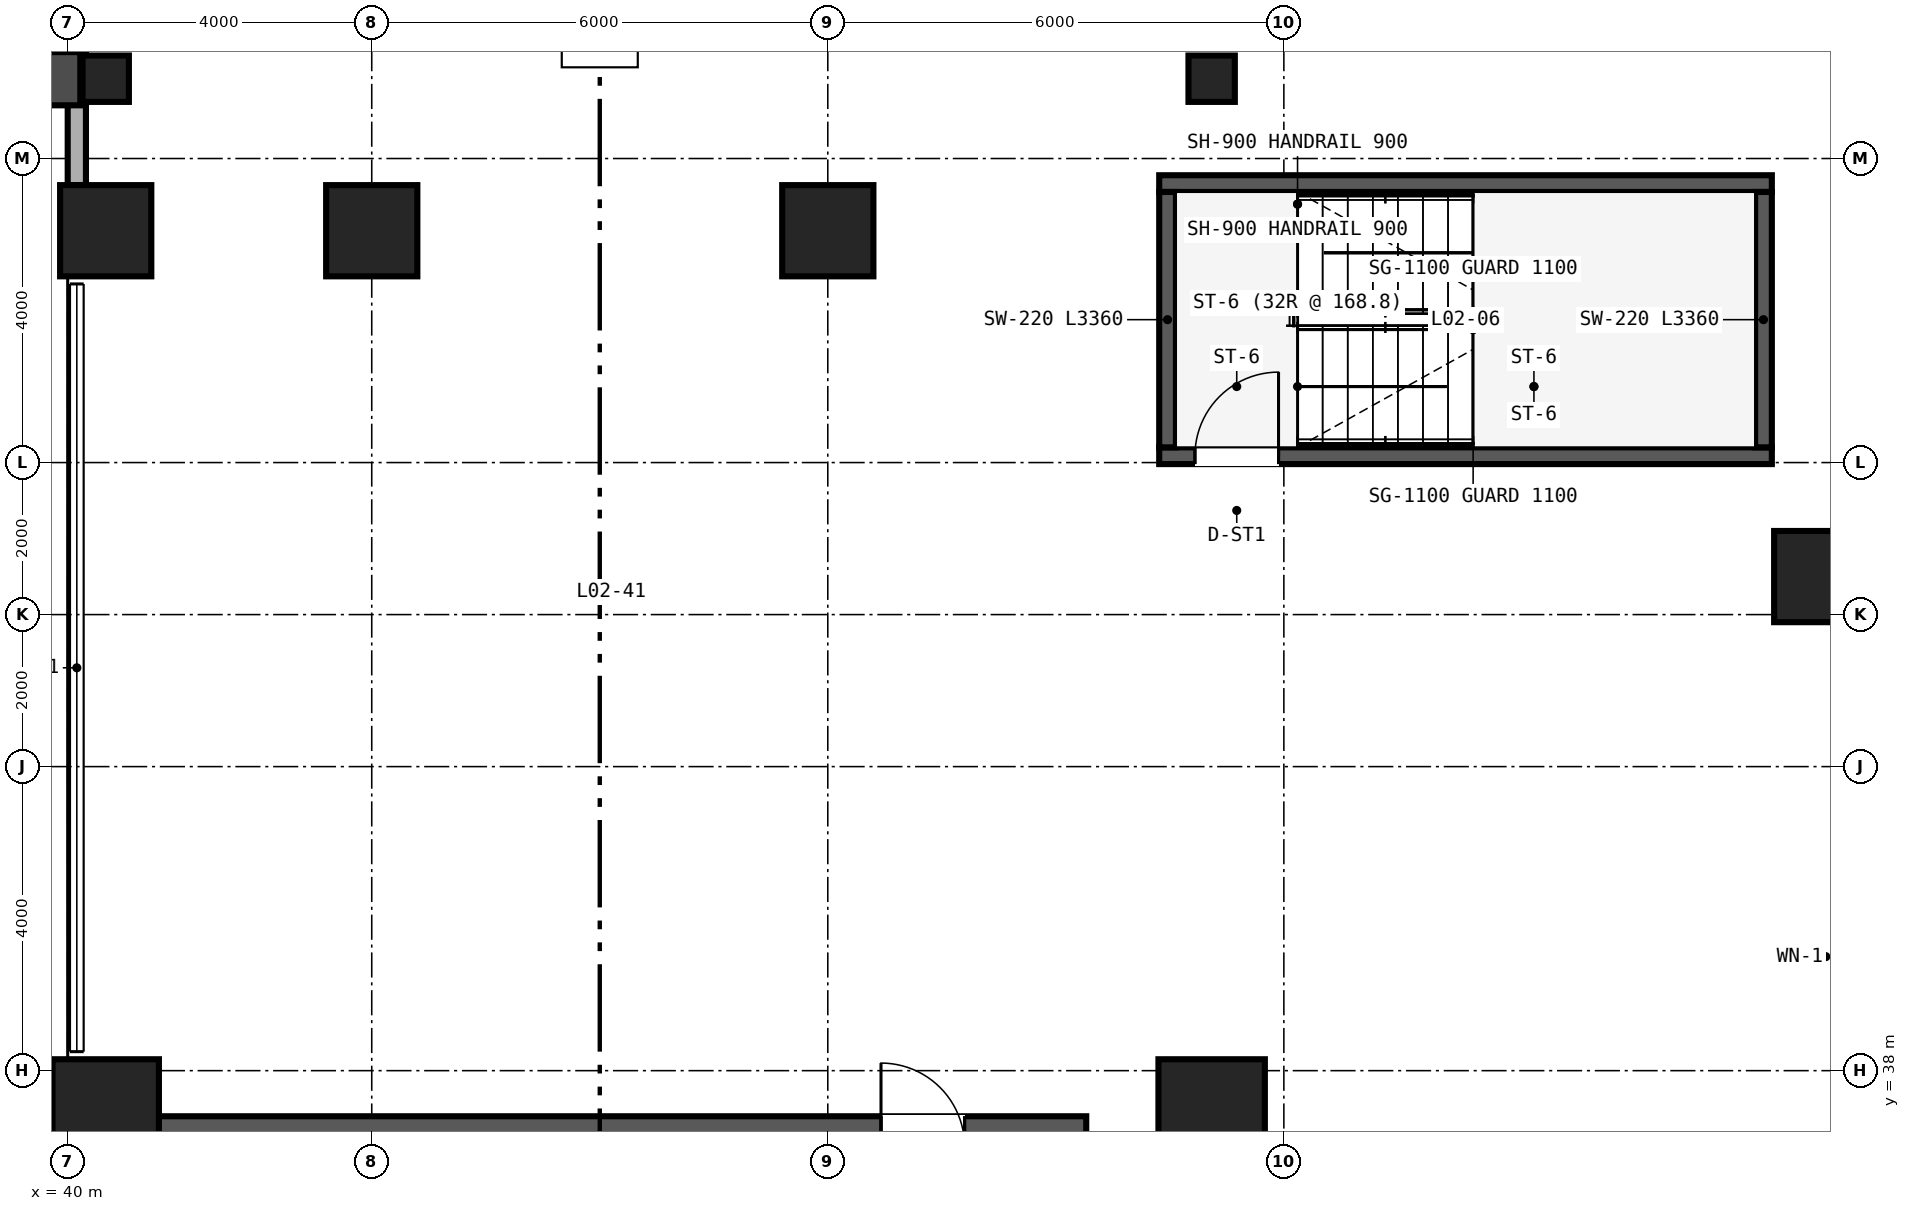
"""IFC4 building model, lengths in metres.
Left out: names, types, materials, properties, quantities, classifications, styles, units other than length and angle.
Written with IfcOpenShell. Run it as: python <this file> out.ifc"""

import sys

from ifc_helpers import new_model, si_unit, direction, frame, frame_2d, origin, origin_2d, place, context, subcontext, project, spatial, rectangle, hollow_circle, extrude, source, transform, mapped, element, fill, save


model = new_model("IFC4")
c1 = context("Model", 3, precision=1e-05, world=origin(), true_north=direction((0.0, 1.0)))
c2 = subcontext(c1, "Body", "Model", "MODEL_VIEW")
j1 = project(units=[si_unit("LENGTHUNIT", "METRE"), si_unit("PLANEANGLEUNIT", "RADIAN")], contexts=[c1])
p1 = place(None, origin())
s1 = spatial("IfcSite", under=j1, at=p1, CompositionType="ELEMENT")
p2 = place(p1, origin())
s2 = spatial("IfcBuilding", under=s1, at=p2, CompositionType="ELEMENT")
p3 = place(p2, frame((0.0, 0.0, 6.0)))
s3 = spatial("IfcBuildingStorey", under=s2, at=p3, CompositionType="ELEMENT", Elevation=6.0)
p4 = place(p3, frame((40.6, 37.0, 0.0), z_axis=(0.0, 0.0, 1.0), x_axis=(1.0, 0.0, 0.0)))
e1 = element("IfcWall", 1, at=p4, inside=s3, PredefinedType="SHEAR", context=c2, shape_type="SweptSolid", body=[
    extrude(rectangle(XDim=12.8, YDim=0.8, at=frame_2d((6.4, 0.0))), origin(), (0.0, 0.0, 1.0), 5.08),
])
p5 = place(p4, frame((10.1, 0.0, 0.0)))
e2 = element("IfcOpeningElement", 2, at=p5, cuts=e1, PredefinedType="OPENING", context=c2, shape_type="SweptSolid", body=[
    extrude(rectangle(XDim=1.1, YDim=2.15, at=frame_2d((0.55, 1.075))), frame((0.0, 0.41, 0.0), z_axis=(0.0, -1.0, 0.0), x_axis=(1.0, 0.0, 0.0)), (0.0, 0.0, 1.0), 0.82),
])
p6 = place(p3, frame((54.36, 46.09, 0.0), z_axis=(0.0, 0.0, 1.0), x_axis=(1.0, 0.0, 0.0)))
e3 = element("IfcWall", 3, at=p6, inside=s3, PredefinedType="SHEAR", context=c2, shape_type="SweptSolid", body=[
    extrude(rectangle(XDim=8.06, YDim=0.22, at=frame_2d((4.03, 0.0))), origin(), (0.0, 0.0, 1.0), 5.2),
])
p7 = place(p6, frame((0.47, 0.0, 0.0)))
e4 = element("IfcOpeningElement", 4, at=p7, cuts=e3, PredefinedType="OPENING", context=c2, shape_type="SweptSolid", body=[
    extrude(rectangle(XDim=1.1, YDim=2.15, at=frame_2d((0.55, 1.075))), frame((0.0, 0.12, 0.0), z_axis=(0.0, -1.0, 0.0), x_axis=(1.0, 0.0, 0.0)), (0.0, 0.0, 1.0), 0.24),
])
p8 = place(p3, frame((54.36, 49.67, 0.0), z_axis=(0.0, 0.0, 1.0), x_axis=(1.0, 0.0, 0.0)))
e5 = element("IfcWall", 5, at=p8, inside=s3, PredefinedType="SHEAR", context=c2, shape_type="SweptSolid", body=[
    extrude(rectangle(XDim=8.06, YDim=0.22, at=frame_2d((4.03, 0.0))), origin(), (0.0, 0.0, 1.0), 5.2),
])
for number, where, z_axis, x_axis in (
    (6, (54.47, 46.2, 0.0), (0.0, 0.0, 1.0), (0.0, 1.0, 0.0)),
    (7, (62.31, 46.2, 0.0), (0.0, 0.0, 1.0), (0.0, 1.0, 0.0)),
):
    element("IfcWall", number, at=place(p3, frame(where, z_axis=z_axis, x_axis=x_axis)), inside=s3, PredefinedType="SHEAR", context=c2, shape_type="SweptSolid", body=[
        extrude(rectangle(XDim=3.36, YDim=0.22, at=frame_2d((1.68, 0.0))), origin(), (0.0, 0.0, 1.0), 5.2),
    ])
m1 = source(origin(), c2, "Body", "SweptSolid", [
    extrude(rectangle(XDim=1.2, YDim=1.2, at=origin_2d()), origin(), (0.0, 0.0, 1.0), 5.08),
])
p9 = place(p3, frame((63.05, 44.5, 0.0), z_axis=(0.0, 0.0, 1.0), x_axis=(1.0, 0.0, 0.0)))
e8 = element("IfcColumn", 8, at=p9, inside=s3, PredefinedType="COLUMN", context=c2, shape_type="MappedRepresentation", body=[
    mapped(m1, transform((0.0, 0.0, 0.0), scale=1.0)),
])
m2 = source(origin(), c2, "Body", "SweptSolid", [
    extrude(hollow_circle(Radius=0.305, WallThickness=0.025, at=origin_2d()), origin(), (0.0, 0.0, 1.0), 5.08),
])
for number, where, z_axis, x_axis in (
    (9, (40.5, 51.05, 0.0), (0.0, 0.0, 1.0), (1.0, 0.0, 0.0)),
    (10, (55.05, 51.05, 0.0), (0.0, 0.0, 1.0), (1.0, 0.0, 0.0)),
):
    element("IfcColumn", number, at=place(p3, frame(where, z_axis=z_axis, x_axis=x_axis)), inside=s3, PredefinedType="COLUMN", context=c2, shape_type="MappedRepresentation", body=[
        mapped(m2, transform((0.0, 0.0, 0.0), scale=1.0)),
    ])
m3 = source(origin(), c2, "Body", "SweptSolid", [
    extrude(rectangle(XDim=1.4, YDim=1.4, at=origin_2d()), origin(), (0.0, 0.0, 1.0), 5.08),
])
for number, where, z_axis, x_axis in (
    (11, (40.5, 37.45, 0.0), (0.0, 0.0, 1.0), (1.0, 0.0, 0.0)),
    (12, (55.05, 37.45, 0.0), (0.0, 0.0, 1.0), (1.0, 0.0, 0.0)),
):
    element("IfcColumn", number, at=place(p3, frame(where, z_axis=z_axis, x_axis=x_axis)), inside=s3, PredefinedType="COLUMN", context=c2, shape_type="MappedRepresentation", body=[
        mapped(m3, transform((0.0, 0.0, 0.0), scale=1.0)),
    ])
for number, where, z_axis, x_axis in (
    (13, (40.5, 49.05, 0.0), (0.0, 0.0, 1.0), (1.0, 0.0, 0.0)),
    (14, (44.0, 49.05, 0.0), (0.0, 0.0, 1.0), (1.0, 0.0, 0.0)),
    (15, (50.0, 49.05, 0.0), (0.0, 0.0, 1.0), (1.0, 0.0, 0.0)),
):
    element("IfcColumn", number, at=place(p3, frame(where, z_axis=z_axis, x_axis=x_axis)), inside=s3, PredefinedType="COLUMN", context=c2, shape_type="MappedRepresentation", body=[
        mapped(m1, transform((0.0, 0.0, 0.0), scale=1.0)),
    ])
p10 = place(p3, frame((40.12, 49.65, 0.0), z_axis=(0.0, 0.0, 1.0), x_axis=(0.0, 1.0, 0.0)))
e16 = element("IfcWall", 16, at=p10, inside=s3, PredefinedType="SOLIDWALL", context=c2, shape_type="SweptSolid", body=[
    extrude(rectangle(XDim=2.05, YDim=0.24, at=frame_2d((1.025, 0.0))), origin(), (0.0, 0.0, 1.0), 4.153),
])
m4 = source(origin(), c2, "Body", "SweptSolid", [
    extrude(rectangle(XDim=1.1, YDim=2.15, at=frame_2d((0.55, 1.075))), frame((0.0, 0.025, 0.0), z_axis=(0.0, -1.0, 0.0), x_axis=(1.0, 0.0, 0.0)), (0.0, 0.0, 1.0), 0.05),
])
p11 = place(p7, origin())
e17 = element("IfcDoor", 17, at=p11, inside=s3, OperationType="SINGLE_SWING_RIGHT", PredefinedType="DOOR", context=c2, shape_type="MappedRepresentation", body=[
    mapped(m4, transform((0.0, 0.0, 0.0), scale=1.0)),
])
fill(e4, e17)
save(model, sys.argv[1])
